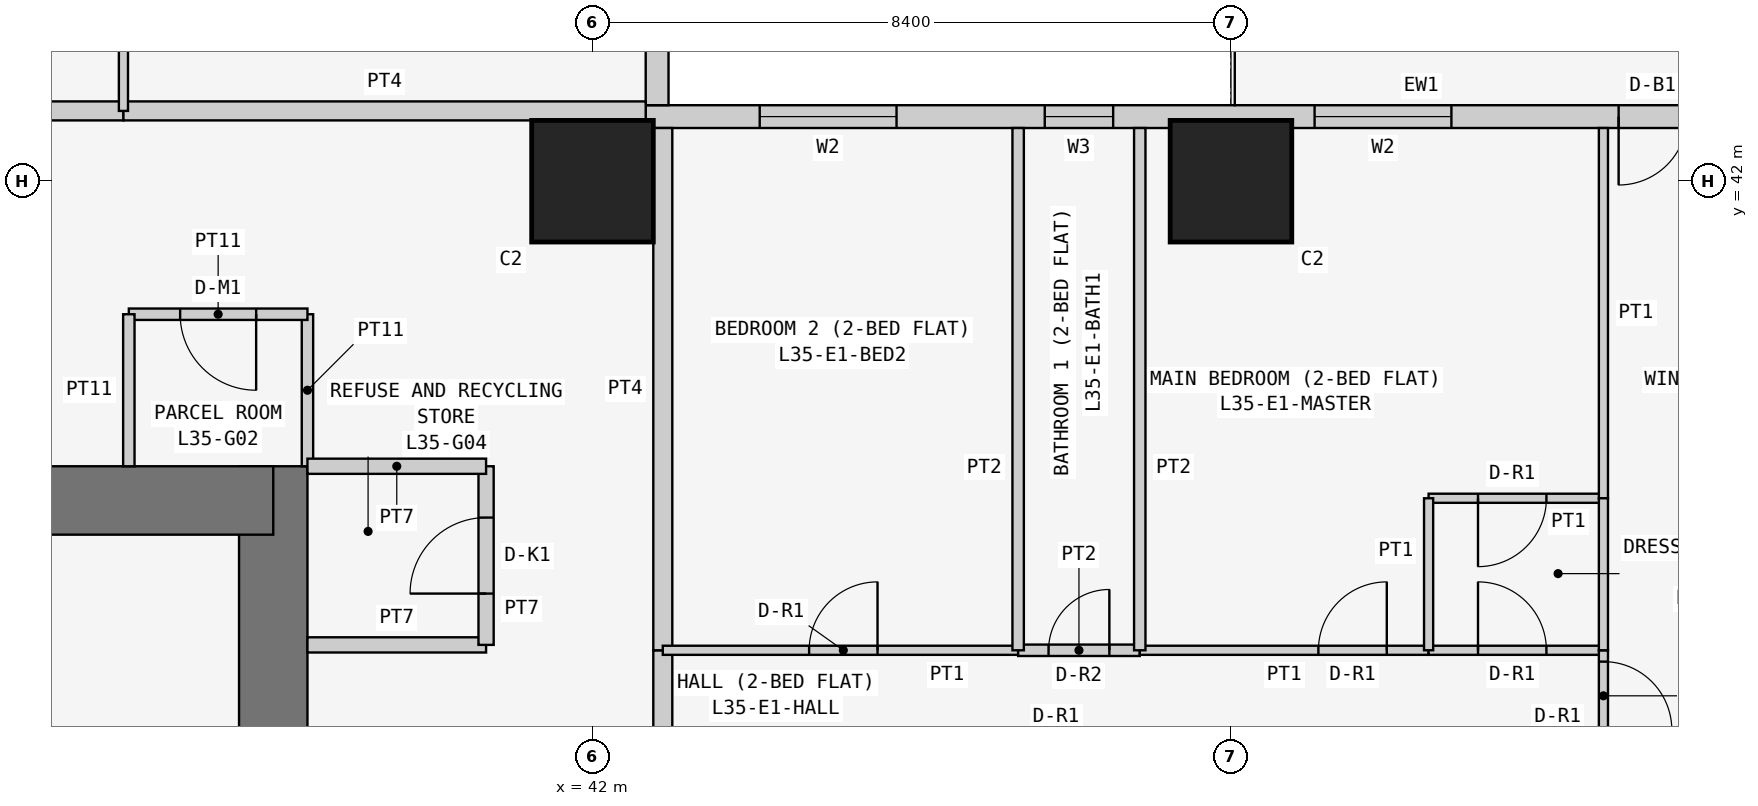
"""IFC4 building model, lengths in metres.
Left out: names, types, materials, properties, quantities, classifications, styles, units other than length and angle.
Written with IfcOpenShell. Run it as: python <this file> out.ifc"""

import sys

from ifc_helpers import new_model, si_unit, direction, frame, frame_2d, origin, origin_2d, place, context, subcontext, project, spatial, rectangle, extrude, element, fill, save


model = new_model("IFC4")
c1 = context("Model", 3, precision=1e-05, world=origin(), true_north=direction((0.0, 1.0)))
c2 = subcontext(c1, "Body", "Model", "MODEL_VIEW")
j1 = project(units=[si_unit("LENGTHUNIT", "METRE"), si_unit("PLANEANGLEUNIT", "RADIAN")], contexts=[c1])
p1 = place(None, origin())
s1 = spatial("IfcSite", under=j1, at=p1, CompositionType="ELEMENT")
p2 = place(p1, origin())
s2 = spatial("IfcBuilding", under=s1, at=p2, CompositionType="ELEMENT")
p3 = place(p2, frame((0.0, 0.0, 137.7)))
s3 = spatial("IfcBuildingStorey", under=s2, at=p3, CompositionType="ELEMENT", Elevation=137.7)
for number, where, z_axis, x_axis in (
    (1, (42.0, 42.0, 0.0), (0.0, 0.0, 1.0), (1.0, 0.0, 0.0)),
    (2, (50.4, 42.0, 0.0), (0.0, 0.0, 1.0), (1.0, 0.0, 0.0)),
):
    element("IfcColumn", number, at=place(p3, frame(where, z_axis=z_axis, x_axis=x_axis)), inside=s3, PredefinedType="COLUMN", context=c2, shape_type="SweptSolid", body=[
        extrude(rectangle(XDim=1.6, YDim=1.6, at=origin_2d()), origin(), (0.0, 0.0, 1.0), 3.6),
    ])
p4 = place(p3, frame((37.8, 21.0, 0.0), z_axis=(0.0, 0.0, 1.0), x_axis=(0.0, 1.0, 0.0)))
e3 = element("IfcWall", 3, at=p4, inside=s3, PredefinedType="SHEAR", context=c2, shape_type="SweptSolid", body=[
    extrude(rectangle(XDim=17.25, YDim=0.9, at=frame_2d((8.625, 0.0))), origin(), (0.0, 0.0, 1.0), 3.6),
])
p5 = place(p4, frame((5.2, 0.0, 0.0)))
e4 = element("IfcOpeningElement", 4, at=p5, cuts=e3, PredefinedType="OPENING", context=c2, shape_type="SweptSolid", body=[
    extrude(rectangle(XDim=1.2, YDim=2.1, at=frame_2d((0.6, 1.05))), frame((0.0, 0.46, 0.0), z_axis=(0.0, -1.0, 0.0), x_axis=(1.0, 0.0, 0.0)), (0.0, 0.0, 1.0), 0.92),
])
p6 = place(p3, frame((37.8, 37.8, 0.0), z_axis=(0.0, 0.0, 1.0), x_axis=(-1.0, 0.0, 0.0)))
e5 = element("IfcWall", 5, at=p6, inside=s3, PredefinedType="SHEAR", context=c2, shape_type="SweptSolid", body=[
    extrude(rectangle(XDim=17.25, YDim=0.9, at=frame_2d((8.625, 0.0))), origin(), (0.0, 0.0, 1.0), 3.6),
])
p7 = place(p3, frame((58.4, 42.85, 0.0), z_axis=(0.0, 0.0, 1.0), x_axis=(-1.0, 0.0, 0.0)))
e6 = element("IfcWall", 6, at=p7, inside=s3, PredefinedType="SOLIDWALL", context=c2, shape_type="SweptSolid", body=[
    extrude(rectangle(XDim=15.7, YDim=0.3, at=frame_2d((7.85, 0.0))), origin(), (0.0, 0.0, 1.0), 3.45),
])
p8 = place(p7, frame((12.4, 0.0, 0.9)))
e7 = element("IfcOpeningElement", 7, at=p8, cuts=e6, PredefinedType="OPENING", context=c2, shape_type="SweptSolid", body=[
    extrude(rectangle(XDim=1.8, YDim=1.5, at=frame_2d((0.9, 0.75))), frame((0.0, 0.16, 0.0), z_axis=(0.0, -1.0, 0.0), x_axis=(1.0, 0.0, 0.0)), (0.0, 0.0, 1.0), 0.32),
])
p9 = place(p7, frame((9.55, 0.0, 1.5)))
e8 = element("IfcOpeningElement", 8, at=p9, cuts=e6, PredefinedType="OPENING", context=c2, shape_type="SweptSolid", body=[
    extrude(rectangle(XDim=0.9, YDim=0.7, at=frame_2d((0.45, 0.35))), frame((0.0, 0.16, 0.0), z_axis=(0.0, -1.0, 0.0), x_axis=(1.0, 0.0, 0.0)), (0.0, 0.0, 1.0), 0.32),
])
p10 = place(p7, frame((5.1, 0.0, 0.9)))
e9 = element("IfcOpeningElement", 9, at=p10, cuts=e6, PredefinedType="OPENING", context=c2, shape_type="SweptSolid", body=[
    extrude(rectangle(XDim=1.8, YDim=1.5, at=frame_2d((0.9, 0.75))), frame((0.0, 0.16, 0.0), z_axis=(0.0, -1.0, 0.0), x_axis=(1.0, 0.0, 0.0)), (0.0, 0.0, 1.0), 0.32),
])
p11 = place(p7, frame((2.0, 0.0, 0.0)))
e10 = element("IfcOpeningElement", 10, at=p11, cuts=e6, PredefinedType="OPENING", context=c2, shape_type="SweptSolid", body=[
    extrude(rectangle(XDim=0.9, YDim=2.4, at=frame_2d((0.45, 1.2))), frame((0.0, 0.16, 0.0), z_axis=(0.0, -1.0, 0.0), x_axis=(1.0, 0.0, 0.0)), (0.0, 0.0, 1.0), 0.32),
])
p12 = place(p7, frame((0.7, 0.0, 0.9)))
e11 = element("IfcOpeningElement", 11, at=p12, cuts=e6, PredefinedType="OPENING", context=c2, shape_type="SweptSolid", body=[
    extrude(rectangle(XDim=1.2, YDim=1.5, at=frame_2d((0.6, 0.75))), frame((0.0, 0.16, 0.0), z_axis=(0.0, -1.0, 0.0), x_axis=(1.0, 0.0, 0.0)), (0.0, 0.0, 1.0), 0.32),
])
p13 = place(p3, frame((42.85, 43.0, 0.0), z_axis=(0.0, 0.0, 1.0), x_axis=(0.0, 1.0, 0.0)))
e12 = element("IfcWall", 12, at=p13, inside=s3, PredefinedType="SOLIDWALL", context=c2, shape_type="SweptSolid", body=[
    extrude(rectangle(XDim=7.0, YDim=0.3, at=frame_2d((3.5, 0.0))), origin(), (0.0, 0.0, 1.0), 3.45),
])
p14 = place(p13, frame((1.5, 0.0, 0.9)))
e13 = element("IfcOpeningElement", 13, at=p14, cuts=e12, PredefinedType="OPENING", context=c2, shape_type="SweptSolid", body=[
    extrude(rectangle(XDim=2.4, YDim=1.5, at=frame_2d((1.2, 0.75))), frame((0.0, 0.16, 0.0), z_axis=(0.0, -1.0, 0.0), x_axis=(1.0, 0.0, 0.0)), (0.0, 0.0, 1.0), 0.32),
])
p15 = place(p13, frame((5.05, 0.0, 0.9)))
e14 = element("IfcOpeningElement", 14, at=p15, cuts=e12, PredefinedType="OPENING", context=c2, shape_type="SweptSolid", body=[
    extrude(rectangle(XDim=1.2, YDim=1.5, at=frame_2d((0.6, 0.75))), frame((0.0, 0.16, 0.0), z_axis=(0.0, -1.0, 0.0), x_axis=(1.0, 0.0, 0.0)), (0.0, 0.0, 1.0), 0.32),
])
p16 = place(p3, frame((38.25, 38.25, 0.0), z_axis=(0.0, 0.0, 1.0), x_axis=(0.0, 1.0, 0.0)))
e15 = element("IfcWall", 15, at=p16, inside=s3, PredefinedType="PARTITIONING", context=c2, shape_type="SweptSolid", body=[
    extrude(rectangle(XDim=2.0, YDim=0.15, at=frame_2d((1.0, 0.0))), origin(), (0.0, 0.0, 1.0), 3.45),
])
p17 = place(p3, frame((38.25, 40.25, 0.0), z_axis=(0.0, 0.0, 1.0), x_axis=(-1.0, 0.0, 0.0)))
e16 = element("IfcWall", 16, at=p17, inside=s3, PredefinedType="PARTITIONING", context=c2, shape_type="SweptSolid", body=[
    extrude(rectangle(XDim=2.35, YDim=0.15, at=frame_2d((1.175, 0.0))), origin(), (0.0, 0.0, 1.0), 3.45),
])
p18 = place(p17, frame((0.675, 0.0, 0.0)))
e17 = element("IfcOpeningElement", 17, at=p18, cuts=e16, PredefinedType="OPENING", context=c2, shape_type="SweptSolid", body=[
    extrude(rectangle(XDim=1.0, YDim=2.1, at=frame_2d((0.5, 1.05))), frame((0.0, 0.085, 0.0), z_axis=(0.0, -1.0, 0.0), x_axis=(1.0, 0.0, 0.0)), (0.0, 0.0, 1.0), 0.17),
])
p19 = place(p3, frame((35.9, 40.25, 0.0), z_axis=(0.0, 0.0, 1.0), x_axis=(0.0, -1.0, 0.0)))
e18 = element("IfcWall", 18, at=p19, inside=s3, PredefinedType="PARTITIONING", context=c2, shape_type="SweptSolid", body=[
    extrude(rectangle(XDim=2.0, YDim=0.15, at=frame_2d((1.0, 0.0))), origin(), (0.0, 0.0, 1.0), 3.45),
])
p20 = place(p3, frame((38.25, 35.9, 0.0), z_axis=(0.0, 0.0, 1.0), x_axis=(1.0, 0.0, 0.0)))
e19 = element("IfcWall", 19, at=p20, inside=s3, PredefinedType="PARTITIONING", context=c2, shape_type="SweptSolid", body=[
    extrude(rectangle(XDim=2.35, YDim=0.2, at=frame_2d((1.175, 0.0))), origin(), (0.0, 0.0, 1.0), 3.45),
])
p21 = place(p3, frame((40.6, 35.9, 0.0), z_axis=(0.0, 0.0, 1.0), x_axis=(0.0, 1.0, 0.0)))
e20 = element("IfcWall", 20, at=p21, inside=s3, PredefinedType="PARTITIONING", context=c2, shape_type="SweptSolid", body=[
    extrude(rectangle(XDim=2.35, YDim=0.2, at=frame_2d((1.175, 0.0))), origin(), (0.0, 0.0, 1.0), 3.45),
])
p22 = place(p21, frame((0.675, 0.0, 0.0)))
e21 = element("IfcOpeningElement", 21, at=p22, cuts=e20, PredefinedType="OPENING", context=c2, shape_type="SweptSolid", body=[
    extrude(rectangle(XDim=1.0, YDim=2.1, at=frame_2d((0.5, 1.05))), frame((0.0, 0.11, 0.0), z_axis=(0.0, -1.0, 0.0), x_axis=(1.0, 0.0, 0.0)), (0.0, 0.0, 1.0), 0.22),
])
p23 = place(p3, frame((40.6, 38.25, 0.0), z_axis=(0.0, 0.0, 1.0), x_axis=(-1.0, 0.0, 0.0)))
e22 = element("IfcWall", 22, at=p23, inside=s3, PredefinedType="PARTITIONING", context=c2, shape_type="SweptSolid", body=[
    extrude(rectangle(XDim=2.35, YDim=0.2, at=frame_2d((1.175, 0.0))), origin(), (0.0, 0.0, 1.0), 3.45),
])
p24 = place(p3, frame((34.629, 42.925, 0.0), z_axis=(0.0, 0.0, 1.0), x_axis=(1.0, 0.0, 0.0)))
e23 = element("IfcWall", 23, at=p24, inside=s3, PredefinedType="PARTITIONING", context=c2, shape_type="SweptSolid", body=[
    extrude(rectangle(XDim=1.2, YDim=0.25, at=frame_2d((0.6, 0.0))), origin(), (0.0, 0.0, 1.0), 3.45),
])
p25 = place(p3, frame((35.829, 42.925, 0.0), z_axis=(0.0, 0.0, 1.0), x_axis=(1.0, 0.0, 0.0)))
e24 = element("IfcWall", 24, at=p25, inside=s3, PredefinedType="PARTITIONING", context=c2, shape_type="SweptSolid", body=[
    extrude(rectangle(XDim=6.871, YDim=0.25, at=frame_2d((3.436, 0.0))), origin(), (0.0, 0.0, 1.0), 3.45),
])
p26 = place(p3, frame((42.925, 35.829, 0.0), z_axis=(0.0, 0.0, 1.0), x_axis=(0.0, -1.0, 0.0)))
e25 = element("IfcWall", 25, at=p26, inside=s3, PredefinedType="PARTITIONING", context=c2, shape_type="SweptSolid", body=[
    extrude(rectangle(XDim=1.2, YDim=0.25, at=frame_2d((0.6, 0.0))), origin(), (0.0, 0.0, 1.0), 3.45),
])
p27 = place(p3, frame((42.925, 42.7, 0.0), z_axis=(0.0, 0.0, 1.0), x_axis=(0.0, -1.0, 0.0)))
e26 = element("IfcWall", 26, at=p27, inside=s3, PredefinedType="PARTITIONING", context=c2, shape_type="SweptSolid", body=[
    extrude(rectangle(XDim=6.871, YDim=0.25, at=frame_2d((3.436, 0.0))), origin(), (0.0, 0.0, 1.0), 3.45),
])
p28 = place(p3, frame((35.829, 47.8, 0.0), z_axis=(0.0, 0.0, 1.0), x_axis=(0.0, -1.0, 0.0)))
e27 = element("IfcWall", 27, at=p28, inside=s3, PredefinedType="PARTITIONING", context=c2, shape_type="SweptSolid", body=[
    extrude(rectangle(XDim=4.875, YDim=0.12, at=frame_2d((2.438, 0.0))), origin(), (0.0, 0.0, 1.0), 3.45),
])
p29 = place(p28, frame((1.95, 0.0, 0.0)))
e28 = element("IfcOpeningElement", 28, at=p29, cuts=e27, PredefinedType="OPENING", context=c2, shape_type="SweptSolid", body=[
    extrude(rectangle(XDim=0.9, YDim=2.1, at=frame_2d((0.45, 1.05))), frame((0.0, 0.07, 0.0), z_axis=(0.0, -1.0, 0.0), x_axis=(1.0, 0.0, 0.0)), (0.0, 0.0, 1.0), 0.14),
])
p30 = place(p3, frame((47.6, 35.829, 0.0), z_axis=(0.0, 0.0, 1.0), x_axis=(-1.0, 0.0, 0.0)))
e29 = element("IfcWall", 29, at=p30, inside=s3, PredefinedType="PARTITIONING", context=c2, shape_type="SweptSolid", body=[
    extrude(rectangle(XDim=4.675, YDim=0.12, at=frame_2d((2.337, 0.0))), origin(), (0.0, 0.0, 1.0), 3.45),
])
p31 = place(p30, frame((1.85, 0.0, 0.0)))
e30 = element("IfcOpeningElement", 30, at=p31, cuts=e29, PredefinedType="OPENING", context=c2, shape_type="SweptSolid", body=[
    extrude(rectangle(XDim=0.9, YDim=2.1, at=frame_2d((0.45, 1.05))), frame((0.0, 0.07, 0.0), z_axis=(0.0, -1.0, 0.0), x_axis=(1.0, 0.0, 0.0)), (0.0, 0.0, 1.0), 0.14),
])
p32 = place(p3, frame((49.2, 35.829, 0.0), z_axis=(0.0, 0.0, 1.0), x_axis=(-1.0, 0.0, 0.0)))
e31 = element("IfcWall", 31, at=p32, inside=s3, PredefinedType="PARTITIONING", context=c2, shape_type="SweptSolid", body=[
    extrude(rectangle(XDim=1.6, YDim=0.15, at=frame_2d((0.8, 0.0))), origin(), (0.0, 0.0, 1.0), 3.45),
])
p33 = place(p32, frame((0.4, 0.0, 0.0)))
e32 = element("IfcOpeningElement", 32, at=p33, cuts=e31, PredefinedType="OPENING", context=c2, shape_type="SweptSolid", body=[
    extrude(rectangle(XDim=0.8, YDim=2.1, at=frame_2d((0.4, 1.05))), frame((0.0, 0.085, 0.0), z_axis=(0.0, -1.0, 0.0), x_axis=(1.0, 0.0, 0.0)), (0.0, 0.0, 1.0), 0.17),
])
p34 = place(p3, frame((53.0, 35.829, 0.0), z_axis=(0.0, 0.0, 1.0), x_axis=(-1.0, 0.0, 0.0)))
e33 = element("IfcWall", 33, at=p34, inside=s3, PredefinedType="PARTITIONING", context=c2, shape_type="SweptSolid", body=[
    extrude(rectangle(XDim=3.8, YDim=0.12, at=frame_2d((1.9, 0.0))), origin(), (0.0, 0.0, 1.0), 3.45),
])
p35 = place(p34, frame((0.55, 0.0, 0.0)))
e34 = element("IfcOpeningElement", 34, at=p35, cuts=e33, PredefinedType="OPENING", context=c2, shape_type="SweptSolid", body=[
    extrude(rectangle(XDim=0.9, YDim=2.1, at=frame_2d((0.45, 1.05))), frame((0.0, 0.07, 0.0), z_axis=(0.0, -1.0, 0.0), x_axis=(1.0, 0.0, 0.0)), (0.0, 0.0, 1.0), 0.14),
])
p36 = place(p3, frame((55.3, 35.829, 0.0), z_axis=(0.0, 0.0, 1.0), x_axis=(-1.0, 0.0, 0.0)))
e35 = element("IfcWall", 35, at=p36, inside=s3, PredefinedType="PARTITIONING", context=c2, shape_type="SweptSolid", body=[
    extrude(rectangle(XDim=2.3, YDim=0.12, at=frame_2d((1.15, 0.0))), origin(), (0.0, 0.0, 1.0), 3.45),
])
p37 = place(p36, frame((0.75, 0.0, 0.0)))
e36 = element("IfcOpeningElement", 36, at=p37, cuts=e35, PredefinedType="OPENING", context=c2, shape_type="SweptSolid", body=[
    extrude(rectangle(XDim=0.9, YDim=2.1, at=frame_2d((0.45, 1.05))), frame((0.0, 0.07, 0.0), z_axis=(0.0, -1.0, 0.0), x_axis=(1.0, 0.0, 0.0)), (0.0, 0.0, 1.0), 0.14),
])
p38 = place(p3, frame((55.3, 34.629, 0.0), z_axis=(0.0, 0.0, 1.0), x_axis=(0.0, 1.0, 0.0)))
e37 = element("IfcWall", 37, at=p38, inside=s3, PredefinedType="PARTITIONING", context=c2, shape_type="SweptSolid", body=[
    extrude(rectangle(XDim=1.2, YDim=0.12, at=frame_2d((0.6, 0.0))), origin(), (0.0, 0.0, 1.0), 3.45),
])
p39 = place(p38, frame((0.151, 0.0, 0.0)))
e38 = element("IfcOpeningElement", 38, at=p39, cuts=e37, PredefinedType="OPENING", context=c2, shape_type="SweptSolid", body=[
    extrude(rectangle(XDim=0.9, YDim=2.1, at=frame_2d((0.45, 1.05))), frame((0.0, 0.07, 0.0), z_axis=(0.0, -1.0, 0.0), x_axis=(1.0, 0.0, 0.0)), (0.0, 0.0, 1.0), 0.14),
])
for number, where, z_axis, x_axis in (
    (39, (47.6, 35.829, 0.0), (0.0, 0.0, 1.0), (0.0, 1.0, 0.0)),
    (40, (49.2, 35.829, 0.0), (0.0, 0.0, 1.0), (0.0, 1.0, 0.0)),
):
    element("IfcWall", number, at=place(p3, frame(where, z_axis=z_axis, x_axis=x_axis)), inside=s3, PredefinedType="PARTITIONING", context=c2, shape_type="SweptSolid", body=[
        extrude(rectangle(XDim=6.871, YDim=0.15, at=frame_2d((3.436, 0.0))), origin(), (0.0, 0.0, 1.0), 3.45),
    ])
p40 = place(p3, frame((55.3, 37.829, 0.0), z_axis=(0.0, 0.0, 1.0), x_axis=(-1.0, 0.0, 0.0)))
e41 = element("IfcWall", 41, at=p40, inside=s3, PredefinedType="PARTITIONING", context=c2, shape_type="SweptSolid", body=[
    extrude(rectangle(XDim=2.3, YDim=0.12, at=frame_2d((1.15, 0.0))), origin(), (0.0, 0.0, 1.0), 3.45),
])
p41 = place(p40, frame((0.75, 0.0, 0.0)))
e42 = element("IfcOpeningElement", 42, at=p41, cuts=e41, PredefinedType="OPENING", context=c2, shape_type="SweptSolid", body=[
    extrude(rectangle(XDim=0.9, YDim=2.1, at=frame_2d((0.45, 1.05))), frame((0.0, 0.07, 0.0), z_axis=(0.0, -1.0, 0.0), x_axis=(1.0, 0.0, 0.0)), (0.0, 0.0, 1.0), 0.14),
])
p42 = place(p3, frame((53.0, 37.829, 0.0), z_axis=(0.0, 0.0, 1.0), x_axis=(0.0, -1.0, 0.0)))
e43 = element("IfcWall", 43, at=p42, inside=s3, PredefinedType="PARTITIONING", context=c2, shape_type="SweptSolid", body=[
    extrude(rectangle(XDim=2.0, YDim=0.12, at=frame_2d((1.0, 0.0))), origin(), (0.0, 0.0, 1.0), 3.45),
])
p43 = place(p3, frame((55.3, 42.7, 0.0), z_axis=(0.0, 0.0, 1.0), x_axis=(0.0, -1.0, 0.0)))
e44 = element("IfcWall", 44, at=p43, inside=s3, PredefinedType="PARTITIONING", context=c2, shape_type="SweptSolid", body=[
    extrude(rectangle(XDim=4.871, YDim=0.12, at=frame_2d((2.436, 0.0))), origin(), (0.0, 0.0, 1.0), 3.45),
])
p44 = place(p3, frame((55.3, 35.829, 0.0), z_axis=(0.0, 0.0, 1.0), x_axis=(0.0, 1.0, 0.0)))
e45 = element("IfcWall", 45, at=p44, inside=s3, PredefinedType="PARTITIONING", context=c2, shape_type="SweptSolid", body=[
    extrude(rectangle(XDim=2.0, YDim=0.12, at=frame_2d((1.0, 0.0))), origin(), (0.0, 0.0, 1.0), 3.45),
])
p45 = place(p8, origin())
e46 = element("IfcWindow", 46, at=p45, inside=s3, PartitioningType="SINGLE_PANEL", PredefinedType="WINDOW", context=c2, shape_type="SweptSolid", body=[
    extrude(rectangle(XDim=1.8, YDim=1.5, at=frame_2d((0.9, 0.75))), frame((0.0, 0.03, 0.0), z_axis=(0.0, -1.0, 0.0), x_axis=(1.0, 0.0, 0.0)), (0.0, 0.0, 1.0), 0.06),
])
fill(e7, e46)
p46 = place(p9, origin())
e47 = element("IfcWindow", 47, at=p46, inside=s3, PartitioningType="SINGLE_PANEL", PredefinedType="WINDOW", context=c2, shape_type="SweptSolid", body=[
    extrude(rectangle(XDim=0.9, YDim=0.7, at=frame_2d((0.45, 0.35))), frame((0.0, 0.03, 0.0), z_axis=(0.0, -1.0, 0.0), x_axis=(1.0, 0.0, 0.0)), (0.0, 0.0, 1.0), 0.06),
])
fill(e8, e47)
p47 = place(p10, origin())
e48 = element("IfcWindow", 48, at=p47, inside=s3, PartitioningType="SINGLE_PANEL", PredefinedType="WINDOW", context=c2, shape_type="SweptSolid", body=[
    extrude(rectangle(XDim=1.8, YDim=1.5, at=frame_2d((0.9, 0.75))), frame((0.0, 0.03, 0.0), z_axis=(0.0, -1.0, 0.0), x_axis=(1.0, 0.0, 0.0)), (0.0, 0.0, 1.0), 0.06),
])
fill(e9, e48)
p48 = place(p11, origin())
e49 = element("IfcDoor", 49, at=p48, inside=s3, OperationType="SINGLE_SWING_RIGHT", PredefinedType="DOOR", context=c2, shape_type="SweptSolid", body=[
    extrude(rectangle(XDim=0.9, YDim=2.4, at=frame_2d((0.45, 1.2))), frame((0.0, 0.025, 0.0), z_axis=(0.0, -1.0, 0.0), x_axis=(1.0, 0.0, 0.0)), (0.0, 0.0, 1.0), 0.05),
])
fill(e10, e49)
p49 = place(p18, origin())
e50 = element("IfcDoor", 50, at=p49, inside=s3, OperationType="SINGLE_SWING_LEFT", PredefinedType="DOOR", context=c2, shape_type="SweptSolid", body=[
    extrude(rectangle(XDim=1.0, YDim=2.1, at=frame_2d((0.5, 1.05))), frame((0.0, 0.025, 0.0), z_axis=(0.0, -1.0, 0.0), x_axis=(1.0, 0.0, 0.0)), (0.0, 0.0, 1.0), 0.05),
])
fill(e17, e50)
p50 = place(p22, origin())
e51 = element("IfcDoor", 51, at=p50, inside=s3, OperationType="SINGLE_SWING_LEFT", PredefinedType="DOOR", context=c2, shape_type="SweptSolid", body=[
    extrude(rectangle(XDim=1.0, YDim=2.1, at=frame_2d((0.5, 1.05))), frame((0.0, 0.025, 0.0), z_axis=(0.0, -1.0, 0.0), x_axis=(1.0, 0.0, 0.0)), (0.0, 0.0, 1.0), 0.05),
])
fill(e21, e51)
p51 = place(p31, frame((0.9, 0.0, 0.0), z_axis=(0.0, 0.0, 1.0), x_axis=(-1.0, 0.0, 0.0)))
e52 = element("IfcDoor", 52, at=p51, inside=s3, OperationType="SINGLE_SWING_RIGHT", PredefinedType="DOOR", context=c2, shape_type="SweptSolid", body=[
    extrude(rectangle(XDim=0.9, YDim=2.1, at=frame_2d((0.45, 1.05))), frame((0.0, 0.025, 0.0), z_axis=(0.0, -1.0, 0.0), x_axis=(1.0, 0.0, 0.0)), (0.0, 0.0, 1.0), 0.05),
])
fill(e30, e52)
p52 = place(p33, frame((0.8, 0.0, 0.0), z_axis=(0.0, 0.0, 1.0), x_axis=(-1.0, 0.0, 0.0)))
e53 = element("IfcDoor", 53, at=p52, inside=s3, OperationType="SINGLE_SWING_RIGHT", PredefinedType="DOOR", context=c2, shape_type="SweptSolid", body=[
    extrude(rectangle(XDim=0.8, YDim=2.1, at=frame_2d((0.4, 1.05))), frame((0.0, 0.025, 0.0), z_axis=(0.0, -1.0, 0.0), x_axis=(1.0, 0.0, 0.0)), (0.0, 0.0, 1.0), 0.05),
])
fill(e32, e53)
p53 = place(p35, frame((0.9, 0.0, 0.0), z_axis=(0.0, 0.0, 1.0), x_axis=(-1.0, 0.0, 0.0)))
e54 = element("IfcDoor", 54, at=p53, inside=s3, OperationType="SINGLE_SWING_RIGHT", PredefinedType="DOOR", context=c2, shape_type="SweptSolid", body=[
    extrude(rectangle(XDim=0.9, YDim=2.1, at=frame_2d((0.45, 1.05))), frame((0.0, 0.025, 0.0), z_axis=(0.0, -1.0, 0.0), x_axis=(1.0, 0.0, 0.0)), (0.0, 0.0, 1.0), 0.05),
])
fill(e34, e54)
p54 = place(p37, frame((0.9, 0.0, 0.0), z_axis=(0.0, 0.0, 1.0), x_axis=(-1.0, 0.0, 0.0)))
e55 = element("IfcDoor", 55, at=p54, inside=s3, OperationType="SINGLE_SWING_LEFT", PredefinedType="DOOR", context=c2, shape_type="SweptSolid", body=[
    extrude(rectangle(XDim=0.9, YDim=2.1, at=frame_2d((0.45, 1.05))), frame((0.0, 0.025, 0.0), z_axis=(0.0, -1.0, 0.0), x_axis=(1.0, 0.0, 0.0)), (0.0, 0.0, 1.0), 0.05),
])
fill(e36, e55)
p55 = place(p41, origin())
e56 = element("IfcDoor", 56, at=p55, inside=s3, OperationType="SINGLE_SWING_RIGHT", PredefinedType="DOOR", context=c2, shape_type="SweptSolid", body=[
    extrude(rectangle(XDim=0.9, YDim=2.1, at=frame_2d((0.45, 1.05))), frame((0.0, 0.025, 0.0), z_axis=(0.0, -1.0, 0.0), x_axis=(1.0, 0.0, 0.0)), (0.0, 0.0, 1.0), 0.05),
])
fill(e42, e56)
p56 = place(p39, frame((0.9, 0.0, 0.0), z_axis=(0.0, 0.0, 1.0), x_axis=(-1.0, 0.0, 0.0)))
e57 = element("IfcDoor", 57, at=p56, inside=s3, OperationType="SINGLE_SWING_RIGHT", PredefinedType="DOOR", context=c2, shape_type="SweptSolid", body=[
    extrude(rectangle(XDim=0.9, YDim=2.1, at=frame_2d((0.45, 1.05))), frame((0.0, 0.025, 0.0), z_axis=(0.0, -1.0, 0.0), x_axis=(1.0, 0.0, 0.0)), (0.0, 0.0, 1.0), 0.05),
])
fill(e38, e57)
save(model, sys.argv[1])
